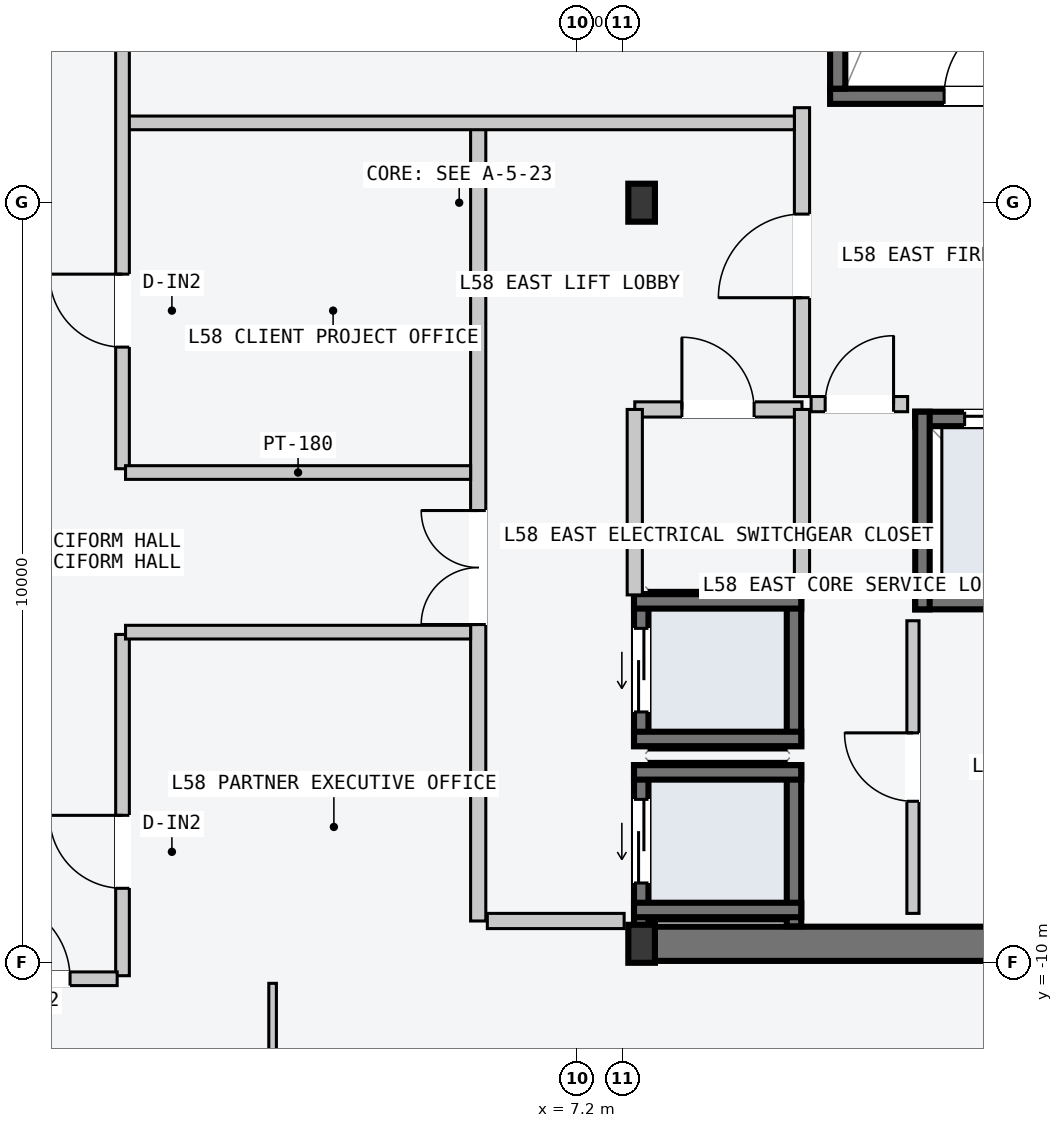
"""IFC4 building model, lengths in metres.
Left out: names, types, materials, properties, quantities, classifications, styles, units other than length and angle.
Written with IfcOpenShell. Run it as: python <this file> out.ifc"""

import sys

from ifc_helpers import new_model, si_unit, direction, frame, frame_2d, origin, origin_2d, place, context, subcontext, project, spatial, rectangle, i_section, extrude, element, fill, save


model = new_model("IFC4")
c1 = context("Model", 3, precision=1e-05, world=origin(), true_north=direction((0.0, 1.0)))
c2 = subcontext(c1, "Body", "Model", "MODEL_VIEW")
j1 = project(units=[si_unit("LENGTHUNIT", "METRE"), si_unit("PLANEANGLEUNIT", "RADIAN")], contexts=[c1])
p1 = place(None, origin())
s1 = spatial("IfcSite", under=j1, at=p1, CompositionType="ELEMENT")
p2 = place(p1, origin())
s2 = spatial("IfcBuilding", under=s1, at=p2, CompositionType="ELEMENT")
p3 = place(p2, frame((0.0, 0.0, 222.0)))
s3 = spatial("IfcBuildingStorey", under=s2, at=p3, CompositionType="ELEMENT", Elevation=222.0)
p4 = place(p3, frame((8.07, -9.75, -0.2), z_axis=(0.0, 0.0, 1.0), x_axis=(1.0, 0.0, 0.0)))
e1 = element("IfcWall", 1, at=p4, inside=s3, PredefinedType="SHEAR", context=c2, shape_type="SweptSolid", body=[
    extrude(rectangle(XDim=6.46, YDim=0.45, at=frame_2d((3.23, 0.0))), origin(), (0.0, 0.0, 1.0), 3.6),
])
p5 = place(p3, frame((10.53, 1.4, -0.2), z_axis=(0.0, 0.0, 1.0), x_axis=(1.0, 0.0, 0.0)))
e2 = element("IfcWall", 2, at=p5, inside=s3, PredefinedType="SOLIDWALL", context=c2, shape_type="SweptSolid", body=[
    extrude(rectangle(XDim=3.72, YDim=0.2, at=frame_2d((1.86, 0.0))), origin(), (0.0, 0.0, 1.0), 3.6),
])
p6 = place(p5, frame((1.5, 0.0, 0.2)))
e3 = element("IfcOpeningElement", 3, at=p6, cuts=e2, PredefinedType="OPENING", context=c2, shape_type="SweptSolid", body=[
    extrude(rectangle(XDim=1.12, YDim=2.18, at=frame_2d((0.56, 1.09))), frame((0.0, 0.11, 0.0), z_axis=(0.0, -1.0, 0.0), x_axis=(1.0, 0.0, 0.0)), (0.0, 0.0, 1.0), 0.22),
])
p7 = place(p3, frame((10.63, 1.5, -0.2), z_axis=(0.0, 0.0, 1.0), x_axis=(0.0, 1.0, 0.0)))
e4 = element("IfcWall", 4, at=p7, inside=s3, PredefinedType="SOLIDWALL", context=c2, shape_type="SweptSolid", body=[
    extrude(rectangle(XDim=7.8, YDim=0.2, at=frame_2d((3.9, 0.0))), origin(), (0.0, 0.0, 1.0), 3.6),
])
for number, where, z_axis, x_axis in (
    (5, (8.05, -9.75, 0.0), (0.0, 0.0, 1.0), (1.0, 0.0, 0.0)),
    (6, (8.05, 0.0, 0.0), (0.0, 0.0, 1.0), (1.0, 0.0, 0.0)),
):
    element("IfcColumn", number, at=place(p3, frame(where, z_axis=z_axis, x_axis=x_axis)), inside=s3, PredefinedType="COLUMN", context=c2, shape_type="SweptSolid", body=[
        extrude(i_section(OverallWidth=0.35, OverallDepth=0.5, WebThickness=0.02, FlangeThickness=0.032, at=origin_2d()), origin(), (0.0, 0.0, 1.0), 3.6),
    ])
p8 = place(p3, frame((8.045, -9.52, -0.2), z_axis=(0.0, 0.0, 1.0), x_axis=(0.0, 1.0, 0.0)))
e7 = element("IfcWall", 7, at=p8, inside=s3, PredefinedType="SOLIDWALL", context=c2, shape_type="SweptSolid", body=[
    extrude(rectangle(XDim=2.12, YDim=0.19, at=frame_2d((1.06, 0.0))), origin(), (0.0, 0.0, 1.0), 3.6),
])
p9 = place(p8, frame((0.57, 0.0, 0.2)))
e8 = element("IfcOpeningElement", 8, at=p9, cuts=e7, PredefinedType="OPENING", context=c2, shape_type="SweptSolid", body=[
    extrude(rectangle(XDim=1.1, YDim=2.2, at=frame_2d((0.55, 1.1))), frame((0.0, 0.105, 0.0), z_axis=(0.0, -1.0, 0.0), x_axis=(1.0, 0.0, 0.0)), (0.0, 0.0, 1.0), 0.21),
])
p10 = place(p3, frame((10.055, -9.52, -0.2), z_axis=(0.0, 0.0, 1.0), x_axis=(0.0, 1.0, 0.0)))
e9 = element("IfcWall", 9, at=p10, inside=s3, PredefinedType="SOLIDWALL", context=c2, shape_type="SweptSolid", body=[
    extrude(rectangle(XDim=2.12, YDim=0.19, at=frame_2d((1.06, 0.0))), origin(), (0.0, 0.0, 1.0), 3.6),
])
for number, where, z_axis, x_axis in (
    (10, (7.95, -7.495, -0.2), (0.0, 0.0, 1.0), (1.0, 0.0, 0.0)),
    (11, (7.95, -9.305, -0.2), (0.0, 0.0, 1.0), (1.0, 0.0, 0.0)),
):
    element("IfcWall", number, at=place(p3, frame(where, z_axis=z_axis, x_axis=x_axis)), inside=s3, PredefinedType="SOLIDWALL", context=c2, shape_type="SweptSolid", body=[
        extrude(rectangle(XDim=2.2, YDim=0.19, at=frame_2d((1.1, 0.0))), origin(), (0.0, 0.0, 1.0), 3.6),
    ])
p11 = place(p3, frame((8.045, -7.15, -0.2), z_axis=(0.0, 0.0, 1.0), x_axis=(0.0, 1.0, 0.0)))
e12 = element("IfcWall", 12, at=p11, inside=s3, PredefinedType="SOLIDWALL", context=c2, shape_type="SweptSolid", body=[
    extrude(rectangle(XDim=2.0, YDim=0.19, at=frame_2d((1.0, 0.0))), origin(), (0.0, 0.0, 1.0), 3.6),
])
p12 = place(p11, frame((0.45, 0.0, 0.2)))
e13 = element("IfcOpeningElement", 13, at=p12, cuts=e12, PredefinedType="OPENING", context=c2, shape_type="SweptSolid", body=[
    extrude(rectangle(XDim=1.1, YDim=2.2, at=frame_2d((0.55, 1.1))), frame((0.0, 0.105, 0.0), z_axis=(0.0, -1.0, 0.0), x_axis=(1.0, 0.0, 0.0)), (0.0, 0.0, 1.0), 0.21),
])
p13 = place(p3, frame((10.055, -7.15, -0.2), z_axis=(0.0, 0.0, 1.0), x_axis=(0.0, 1.0, 0.0)))
e14 = element("IfcWall", 14, at=p13, inside=s3, PredefinedType="SOLIDWALL", context=c2, shape_type="SweptSolid", body=[
    extrude(rectangle(XDim=2.0, YDim=0.19, at=frame_2d((1.0, 0.0))), origin(), (0.0, 0.0, 1.0), 3.6),
])
for number, where, z_axis, x_axis in (
    (15, (7.95, -5.245, -0.2), (0.0, 0.0, 1.0), (1.0, 0.0, 0.0)),
    (16, (7.95, -7.055, -0.2), (0.0, 0.0, 1.0), (1.0, 0.0, 0.0)),
):
    element("IfcWall", number, at=place(p3, frame(where, z_axis=z_axis, x_axis=x_axis)), inside=s3, PredefinedType="SOLIDWALL", context=c2, shape_type="SweptSolid", body=[
        extrude(rectangle(XDim=2.2, YDim=0.19, at=frame_2d((1.1, 0.0))), origin(), (0.0, 0.0, 1.0), 3.6),
    ])
p14 = place(p3, frame((11.65, -2.845, -0.2), z_axis=(0.0, 0.0, 1.0), x_axis=(1.0, 0.0, 0.0)))
e17 = element("IfcWall", 17, at=p14, inside=s3, PredefinedType="SOLIDWALL", context=c2, shape_type="SweptSolid", body=[
    extrude(rectangle(XDim=2.68, YDim=0.19, at=frame_2d((1.34, 0.0))), origin(), (0.0, 0.0, 1.0), 3.6),
])
p15 = place(p14, frame((0.65, 0.0, 0.2)))
e18 = element("IfcOpeningElement", 18, at=p15, cuts=e17, PredefinedType="OPENING", context=c2, shape_type="SweptSolid", body=[
    extrude(rectangle(XDim=1.2, YDim=2.2, at=frame_2d((0.6, 1.1))), frame((0.0, 0.105, 0.0), z_axis=(0.0, -1.0, 0.0), x_axis=(1.0, 0.0, 0.0)), (0.0, 0.0, 1.0), 0.21),
])
p16 = place(p3, frame((11.65, -5.255, -0.2), z_axis=(0.0, 0.0, 1.0), x_axis=(1.0, 0.0, 0.0)))
e19 = element("IfcWall", 19, at=p16, inside=s3, PredefinedType="SOLIDWALL", context=c2, shape_type="SweptSolid", body=[
    extrude(rectangle(XDim=2.68, YDim=0.19, at=frame_2d((1.34, 0.0))), origin(), (0.0, 0.0, 1.0), 3.6),
])
p17 = place(p3, frame((11.745, -5.35, -0.2), z_axis=(0.0, 0.0, 1.0), x_axis=(0.0, 1.0, 0.0)))
e20 = element("IfcWall", 20, at=p17, inside=s3, PredefinedType="SOLIDWALL", context=c2, shape_type="SweptSolid", body=[
    extrude(rectangle(XDim=2.6, YDim=0.19, at=frame_2d((1.3, 0.0))), origin(), (0.0, 0.0, 1.0), 3.6),
])
p18 = place(p3, frame((5.9, -9.45, 0.0), z_axis=(0.0, 0.0, 1.0), x_axis=(0.0, 1.0, 0.0)))
e21 = element("IfcWall", 21, at=p18, inside=s3, PredefinedType="PARTITIONING", context=c2, shape_type="SweptSolid", body=[
    extrude(rectangle(XDim=10.5, YDim=0.2, at=frame_2d((5.25, 0.0))), origin(), (0.0, 0.0, 1.0), 3.4),
])
p19 = place(p18, frame((3.9, 0.0, 0.0)))
e22 = element("IfcOpeningElement", 22, at=p19, cuts=e21, PredefinedType="OPENING", context=c2, shape_type="SweptSolid", body=[
    extrude(rectangle(XDim=1.5, YDim=2.2, at=frame_2d((0.75, 1.1))), frame((0.0, 0.11, 0.0), z_axis=(0.0, -1.0, 0.0), x_axis=(1.0, 0.0, 0.0)), (0.0, 0.0, 1.0), 0.22),
])
p20 = place(p3, frame((6.02, -9.45, 0.0), z_axis=(0.0, 0.0, 1.0), x_axis=(1.0, 0.0, 0.0)))
e23 = element("IfcWall", 23, at=p20, inside=s3, PredefinedType="PARTITIONING", context=c2, shape_type="SweptSolid", body=[
    extrude(rectangle(XDim=1.8, YDim=0.2, at=frame_2d((0.9, 0.0))), origin(), (0.0, 0.0, 1.0), 3.4),
])
p21 = place(p3, frame((10.16, -2.55, 0.0), z_axis=(0.0, 0.0, 1.0), x_axis=(0.0, 1.0, 0.0)))
e24 = element("IfcWall", 24, at=p21, inside=s3, PredefinedType="PARTITIONING", context=c2, shape_type="SweptSolid", body=[
    extrude(rectangle(XDim=3.8, YDim=0.2, at=frame_2d((1.9, 0.0))), origin(), (0.0, 0.0, 1.0), 3.4),
])
p22 = place(p21, frame((1.3, 0.0, 0.0)))
e25 = element("IfcOpeningElement", 25, at=p22, cuts=e24, PredefinedType="OPENING", context=c2, shape_type="SweptSolid", body=[
    extrude(rectangle(XDim=1.1, YDim=2.15, at=frame_2d((0.55, 1.075))), frame((0.0, 0.11, 0.0), z_axis=(0.0, -1.0, 0.0), x_axis=(1.0, 0.0, 0.0)), (0.0, 0.0, 1.0), 0.22),
])
p23 = place(p3, frame((10.28, -2.65, 0.0), z_axis=(0.0, 0.0, 1.0), x_axis=(1.0, 0.0, 0.0)))
e26 = element("IfcWall", 26, at=p23, inside=s3, PredefinedType="PARTITIONING", context=c2, shape_type="SweptSolid", body=[
    extrude(rectangle(XDim=1.27, YDim=0.2, at=frame_2d((0.635, 0.0))), origin(), (0.0, 0.0, 1.0), 3.4),
])
p24 = place(p23, frame((0.185, 0.0, 0.0)))
e27 = element("IfcOpeningElement", 27, at=p24, cuts=e26, PredefinedType="OPENING", context=c2, shape_type="SweptSolid", body=[
    extrude(rectangle(XDim=0.9, YDim=2.15, at=frame_2d((0.45, 1.075))), frame((0.0, 0.11, 0.0), z_axis=(0.0, -1.0, 0.0), x_axis=(1.0, 0.0, 0.0)), (0.0, 0.0, 1.0), 0.22),
])
p25 = place(p3, frame((7.96, -2.72, 0.0), z_axis=(0.0, 0.0, 1.0), x_axis=(1.0, 0.0, 0.0)))
e28 = element("IfcWall", 28, at=p25, inside=s3, PredefinedType="PARTITIONING", context=c2, shape_type="SweptSolid", body=[
    extrude(rectangle(XDim=2.2, YDim=0.2, at=frame_2d((1.1, 0.0))), origin(), (0.0, 0.0, 1.0), 3.4),
])
p26 = place(p25, frame((0.62, 0.0, 0.0)))
e29 = element("IfcOpeningElement", 29, at=p26, cuts=e28, PredefinedType="OPENING", context=c2, shape_type="SweptSolid", body=[
    extrude(rectangle(XDim=0.95, YDim=2.1, at=frame_2d((0.475, 1.05))), frame((0.0, 0.11, 0.0), z_axis=(0.0, -1.0, 0.0), x_axis=(1.0, 0.0, 0.0)), (0.0, 0.0, 1.0), 0.22),
])
for number, where, z_axis, x_axis in (
    (30, (7.96, -5.16, 0.0), (0.0, 0.0, 1.0), (0.0, 1.0, 0.0)),
    (31, (10.16, -5.16, 0.0), (0.0, 0.0, 1.0), (0.0, 1.0, 0.0)),
):
    element("IfcWall", number, at=place(p3, frame(where, z_axis=z_axis, x_axis=x_axis)), inside=s3, PredefinedType="PARTITIONING", context=c2, shape_type="SweptSolid", body=[
        extrude(rectangle(XDim=2.44, YDim=0.2, at=frame_2d((1.22, 0.0))), origin(), (0.0, 0.0, 1.0), 3.4),
    ])
p27 = place(p3, frame((11.62, -9.35, 0.0), z_axis=(0.0, 0.0, 1.0), x_axis=(0.0, 1.0, 0.0)))
e32 = element("IfcWall", 32, at=p27, inside=s3, PredefinedType="PARTITIONING", context=c2, shape_type="SweptSolid", body=[
    extrude(rectangle(XDim=3.85, YDim=0.16, at=frame_2d((1.925, 0.0))), origin(), (0.0, 0.0, 1.0), 3.4),
])
p28 = place(p27, frame((1.475, 0.0, 0.0)))
e33 = element("IfcOpeningElement", 33, at=p28, cuts=e32, PredefinedType="OPENING", context=c2, shape_type="SweptSolid", body=[
    extrude(rectangle(XDim=0.9, YDim=2.15, at=frame_2d((0.45, 1.075))), frame((0.0, 0.09, 0.0), z_axis=(0.0, -1.0, 0.0), x_axis=(1.0, 0.0, 0.0)), (0.0, 0.0, 1.0), 0.18),
])
p29 = place(p3, frame((1.26, 1.05, 0.0), z_axis=(0.0, 0.0, 1.0), x_axis=(1.0, 0.0, 0.0)))
e34 = element("IfcWall", 34, at=p29, inside=s3, PredefinedType="PARTITIONING", context=c2, shape_type="SweptSolid", body=[
    extrude(rectangle(XDim=8.8, YDim=0.18, at=frame_2d((4.4, 0.0))), origin(), (0.0, 0.0, 1.0), 3.4),
])
p30 = place(p3, frame((1.22, -3.5, 0.0), z_axis=(0.0, 0.0, 1.0), x_axis=(0.0, 1.0, 0.0)))
e35 = element("IfcWall", 35, at=p30, inside=s3, PredefinedType="PARTITIONING", context=c2, shape_type="SweptSolid", body=[
    extrude(rectangle(XDim=12.81, YDim=0.18, at=frame_2d((6.405, 0.0))), origin(), (0.0, 0.0, 1.0), 3.4),
])
p31 = place(p30, frame((6.1, 0.0, 0.0)))
e36 = element("IfcOpeningElement", 36, at=p31, cuts=e35, PredefinedType="OPENING", context=c2, shape_type="SweptSolid", body=[
    extrude(rectangle(XDim=1.24, YDim=2.24, at=frame_2d((0.62, 1.12))), frame((0.0, 0.1, 0.0), z_axis=(0.0, -1.0, 0.0), x_axis=(1.0, 0.0, 0.0)), (0.0, 0.0, 1.0), 0.2),
])
p32 = place(p30, frame((1.6, 0.0, 0.0)))
e37 = element("IfcOpeningElement", 37, at=p32, cuts=e35, PredefinedType="OPENING", context=c2, shape_type="SweptSolid", body=[
    extrude(rectangle(XDim=0.96, YDim=2.18, at=frame_2d((0.48, 1.09))), frame((0.0, 0.1, 0.0), z_axis=(0.0, -1.0, 0.0), x_axis=(1.0, 0.0, 0.0)), (0.0, 0.0, 1.0), 0.2),
])
p33 = place(p3, frame((1.26, -3.55, 0.0), z_axis=(0.0, 0.0, 1.0), x_axis=(1.0, 0.0, 0.0)))
e38 = element("IfcWall", 38, at=p33, inside=s3, PredefinedType="PARTITIONING", context=c2, shape_type="SweptSolid", body=[
    extrude(rectangle(XDim=4.54, YDim=0.18, at=frame_2d((2.27, 0.0))), origin(), (0.0, 0.0, 1.0), 3.4),
])
p34 = place(p3, frame((1.22, -10.17, 0.0), z_axis=(0.0, 0.0, 1.0), x_axis=(0.0, 1.0, 0.0)))
e39 = element("IfcWall", 39, at=p34, inside=s3, PredefinedType="PARTITIONING", context=c2, shape_type="SweptSolid", body=[
    extrude(rectangle(XDim=4.49, YDim=0.18, at=frame_2d((2.245, 0.0))), origin(), (0.0, 0.0, 1.0), 3.4),
])
p35 = place(p34, frame((1.15, 0.0, 0.0)))
e40 = element("IfcOpeningElement", 40, at=p35, cuts=e39, PredefinedType="OPENING", context=c2, shape_type="SweptSolid", body=[
    extrude(rectangle(XDim=0.96, YDim=2.18, at=frame_2d((0.48, 1.09))), frame((0.0, 0.1, 0.0), z_axis=(0.0, -1.0, 0.0), x_axis=(1.0, 0.0, 0.0)), (0.0, 0.0, 1.0), 0.2),
])
p36 = place(p3, frame((1.26, -5.65, 0.0), z_axis=(0.0, 0.0, 1.0), x_axis=(1.0, 0.0, 0.0)))
e41 = element("IfcWall", 41, at=p36, inside=s3, PredefinedType="PARTITIONING", context=c2, shape_type="SweptSolid", body=[
    extrude(rectangle(XDim=4.54, YDim=0.18, at=frame_2d((2.27, 0.0))), origin(), (0.0, 0.0, 1.0), 3.4),
])
p37 = place(p3, frame((3.195, -17.56, 0.0), z_axis=(0.0, 0.0, 1.0), x_axis=(0.0, 1.0, 0.0)))
e42 = element("IfcWall", 42, at=p37, inside=s3, PredefinedType="PARTITIONING", context=c2, shape_type="SweptSolid", body=[
    extrude(rectangle(XDim=7.29, YDim=0.1, at=frame_2d((3.645, 0.0))), origin(), (0.0, 0.0, 1.0), 3.4),
])
p38 = place(p37, frame((1.05, 0.0, 0.0)))
e43 = element("IfcOpeningElement", 43, at=p38, cuts=e42, PredefinedType="OPENING", context=c2, shape_type="SweptSolid", body=[
    extrude(rectangle(XDim=0.96, YDim=2.18, at=frame_2d((0.48, 1.09))), frame((0.0, 0.06, 0.0), z_axis=(0.0, -1.0, 0.0), x_axis=(1.0, 0.0, 0.0)), (0.0, 0.0, 1.0), 0.12),
])
p39 = place(p3, frame((-1.15, -10.21, 0.0), z_axis=(0.0, 0.0, 1.0), x_axis=(1.0, 0.0, 0.0)))
e44 = element("IfcWall", 44, at=p39, inside=s3, PredefinedType="PARTITIONING", context=c2, shape_type="SweptSolid", body=[
    extrude(rectangle(XDim=2.3, YDim=0.18, at=frame_2d((1.15, 0.0))), origin(), (0.0, 0.0, 1.0), 3.4),
])
p40 = place(p39, frame((0.62, 0.0, 0.0)))
e45 = element("IfcOpeningElement", 45, at=p40, cuts=e44, PredefinedType="OPENING", context=c2, shape_type="SweptSolid", body=[
    extrude(rectangle(XDim=1.06, YDim=2.2, at=frame_2d((0.53, 1.1))), frame((0.0, 0.1, 0.0), z_axis=(0.0, -1.0, 0.0), x_axis=(1.0, 0.0, 0.0)), (0.0, 0.0, 1.0), 0.2),
])
p41 = place(p6, origin())
e46 = element("IfcDoor", 46, at=p41, inside=s3, OperationType="SINGLE_SWING_RIGHT", PredefinedType="DOOR", context=c2, shape_type="SweptSolid", body=[
    extrude(rectangle(XDim=1.12, YDim=2.18, at=frame_2d((0.56, 1.09))), frame((0.0, 0.025, 0.0), z_axis=(0.0, -1.0, 0.0), x_axis=(1.0, 0.0, 0.0)), (0.0, 0.0, 1.0), 0.05),
])
fill(e3, e46)
p42 = place(p9, origin())
e47 = element("IfcDoor", 47, at=p42, inside=s3, OperationType="SLIDING_TO_LEFT", PredefinedType="DOOR", context=c2, shape_type="SweptSolid", body=[
    extrude(rectangle(XDim=1.1, YDim=2.2, at=frame_2d((0.55, 1.1))), frame((0.0, 0.025, 0.0), z_axis=(0.0, -1.0, 0.0), x_axis=(1.0, 0.0, 0.0)), (0.0, 0.0, 1.0), 0.05),
])
fill(e8, e47)
p43 = place(p12, origin())
e48 = element("IfcDoor", 48, at=p43, inside=s3, OperationType="SLIDING_TO_LEFT", PredefinedType="DOOR", context=c2, shape_type="SweptSolid", body=[
    extrude(rectangle(XDim=1.1, YDim=2.2, at=frame_2d((0.55, 1.1))), frame((0.0, 0.025, 0.0), z_axis=(0.0, -1.0, 0.0), x_axis=(1.0, 0.0, 0.0)), (0.0, 0.0, 1.0), 0.05),
])
fill(e13, e48)
p44 = place(p15, origin())
e49 = element("IfcDoor", 49, at=p44, inside=s3, OperationType="SLIDING_TO_LEFT", PredefinedType="DOOR", context=c2, shape_type="SweptSolid", body=[
    extrude(rectangle(XDim=1.2, YDim=2.2, at=frame_2d((0.6, 1.1))), frame((0.0, 0.025, 0.0), z_axis=(0.0, -1.0, 0.0), x_axis=(1.0, 0.0, 0.0)), (0.0, 0.0, 1.0), 0.05),
])
fill(e18, e49)
p45 = place(p19, origin())
e50 = element("IfcDoor", 50, at=p45, inside=s3, OperationType="DOUBLE_DOOR_SINGLE_SWING", PredefinedType="DOOR", context=c2, shape_type="SweptSolid", body=[
    extrude(rectangle(XDim=1.5, YDim=2.2, at=frame_2d((0.75, 1.1))), frame((0.0, 0.025, 0.0), z_axis=(0.0, -1.0, 0.0), x_axis=(1.0, 0.0, 0.0)), (0.0, 0.0, 1.0), 0.05),
])
fill(e22, e50)
p46 = place(p22, origin())
e51 = element("IfcDoor", 51, at=p46, inside=s3, OperationType="SINGLE_SWING_LEFT", PredefinedType="DOOR", context=c2, shape_type="SweptSolid", body=[
    extrude(rectangle(XDim=1.1, YDim=2.15, at=frame_2d((0.55, 1.075))), frame((0.0, 0.025, 0.0), z_axis=(0.0, -1.0, 0.0), x_axis=(1.0, 0.0, 0.0)), (0.0, 0.0, 1.0), 0.05),
])
fill(e25, e51)
p47 = place(p24, origin())
e52 = element("IfcDoor", 52, at=p47, inside=s3, OperationType="SINGLE_SWING_RIGHT", PredefinedType="DOOR", context=c2, shape_type="SweptSolid", body=[
    extrude(rectangle(XDim=0.9, YDim=2.15, at=frame_2d((0.45, 1.075))), frame((0.0, 0.025, 0.0), z_axis=(0.0, -1.0, 0.0), x_axis=(1.0, 0.0, 0.0)), (0.0, 0.0, 1.0), 0.05),
])
fill(e27, e52)
p48 = place(p26, origin())
e53 = element("IfcDoor", 53, at=p48, inside=s3, OperationType="SINGLE_SWING_LEFT", PredefinedType="DOOR", context=c2, shape_type="SweptSolid", body=[
    extrude(rectangle(XDim=0.95, YDim=2.1, at=frame_2d((0.475, 1.05))), frame((0.0, 0.025, 0.0), z_axis=(0.0, -1.0, 0.0), x_axis=(1.0, 0.0, 0.0)), (0.0, 0.0, 1.0), 0.05),
])
fill(e29, e53)
p49 = place(p28, origin())
e54 = element("IfcDoor", 54, at=p49, inside=s3, OperationType="SINGLE_SWING_RIGHT", PredefinedType="DOOR", context=c2, shape_type="SweptSolid", body=[
    extrude(rectangle(XDim=0.9, YDim=2.15, at=frame_2d((0.45, 1.075))), frame((0.0, 0.025, 0.0), z_axis=(0.0, -1.0, 0.0), x_axis=(1.0, 0.0, 0.0)), (0.0, 0.0, 1.0), 0.05),
])
fill(e33, e54)
p50 = place(p32, origin())
e55 = element("IfcDoor", 55, at=p50, inside=s3, OperationType="SINGLE_SWING_RIGHT", PredefinedType="DOOR", context=c2, shape_type="SweptSolid", body=[
    extrude(rectangle(XDim=0.96, YDim=2.18, at=frame_2d((0.48, 1.09))), frame((0.0, 0.025, 0.0), z_axis=(0.0, -1.0, 0.0), x_axis=(1.0, 0.0, 0.0)), (0.0, 0.0, 1.0), 0.05),
])
fill(e37, e55)
p51 = place(p35, origin())
e56 = element("IfcDoor", 56, at=p51, inside=s3, OperationType="SINGLE_SWING_RIGHT", PredefinedType="DOOR", context=c2, shape_type="SweptSolid", body=[
    extrude(rectangle(XDim=0.96, YDim=2.18, at=frame_2d((0.48, 1.09))), frame((0.0, 0.025, 0.0), z_axis=(0.0, -1.0, 0.0), x_axis=(1.0, 0.0, 0.0)), (0.0, 0.0, 1.0), 0.05),
])
fill(e40, e56)
p52 = place(p40, origin())
e57 = element("IfcDoor", 57, at=p52, inside=s3, OperationType="SINGLE_SWING_LEFT", PredefinedType="DOOR", context=c2, shape_type="SweptSolid", body=[
    extrude(rectangle(XDim=1.06, YDim=2.2, at=frame_2d((0.53, 1.1))), frame((0.0, 0.025, 0.0), z_axis=(0.0, -1.0, 0.0), x_axis=(1.0, 0.0, 0.0)), (0.0, 0.0, 1.0), 0.05),
])
fill(e45, e57)
save(model, sys.argv[1])
